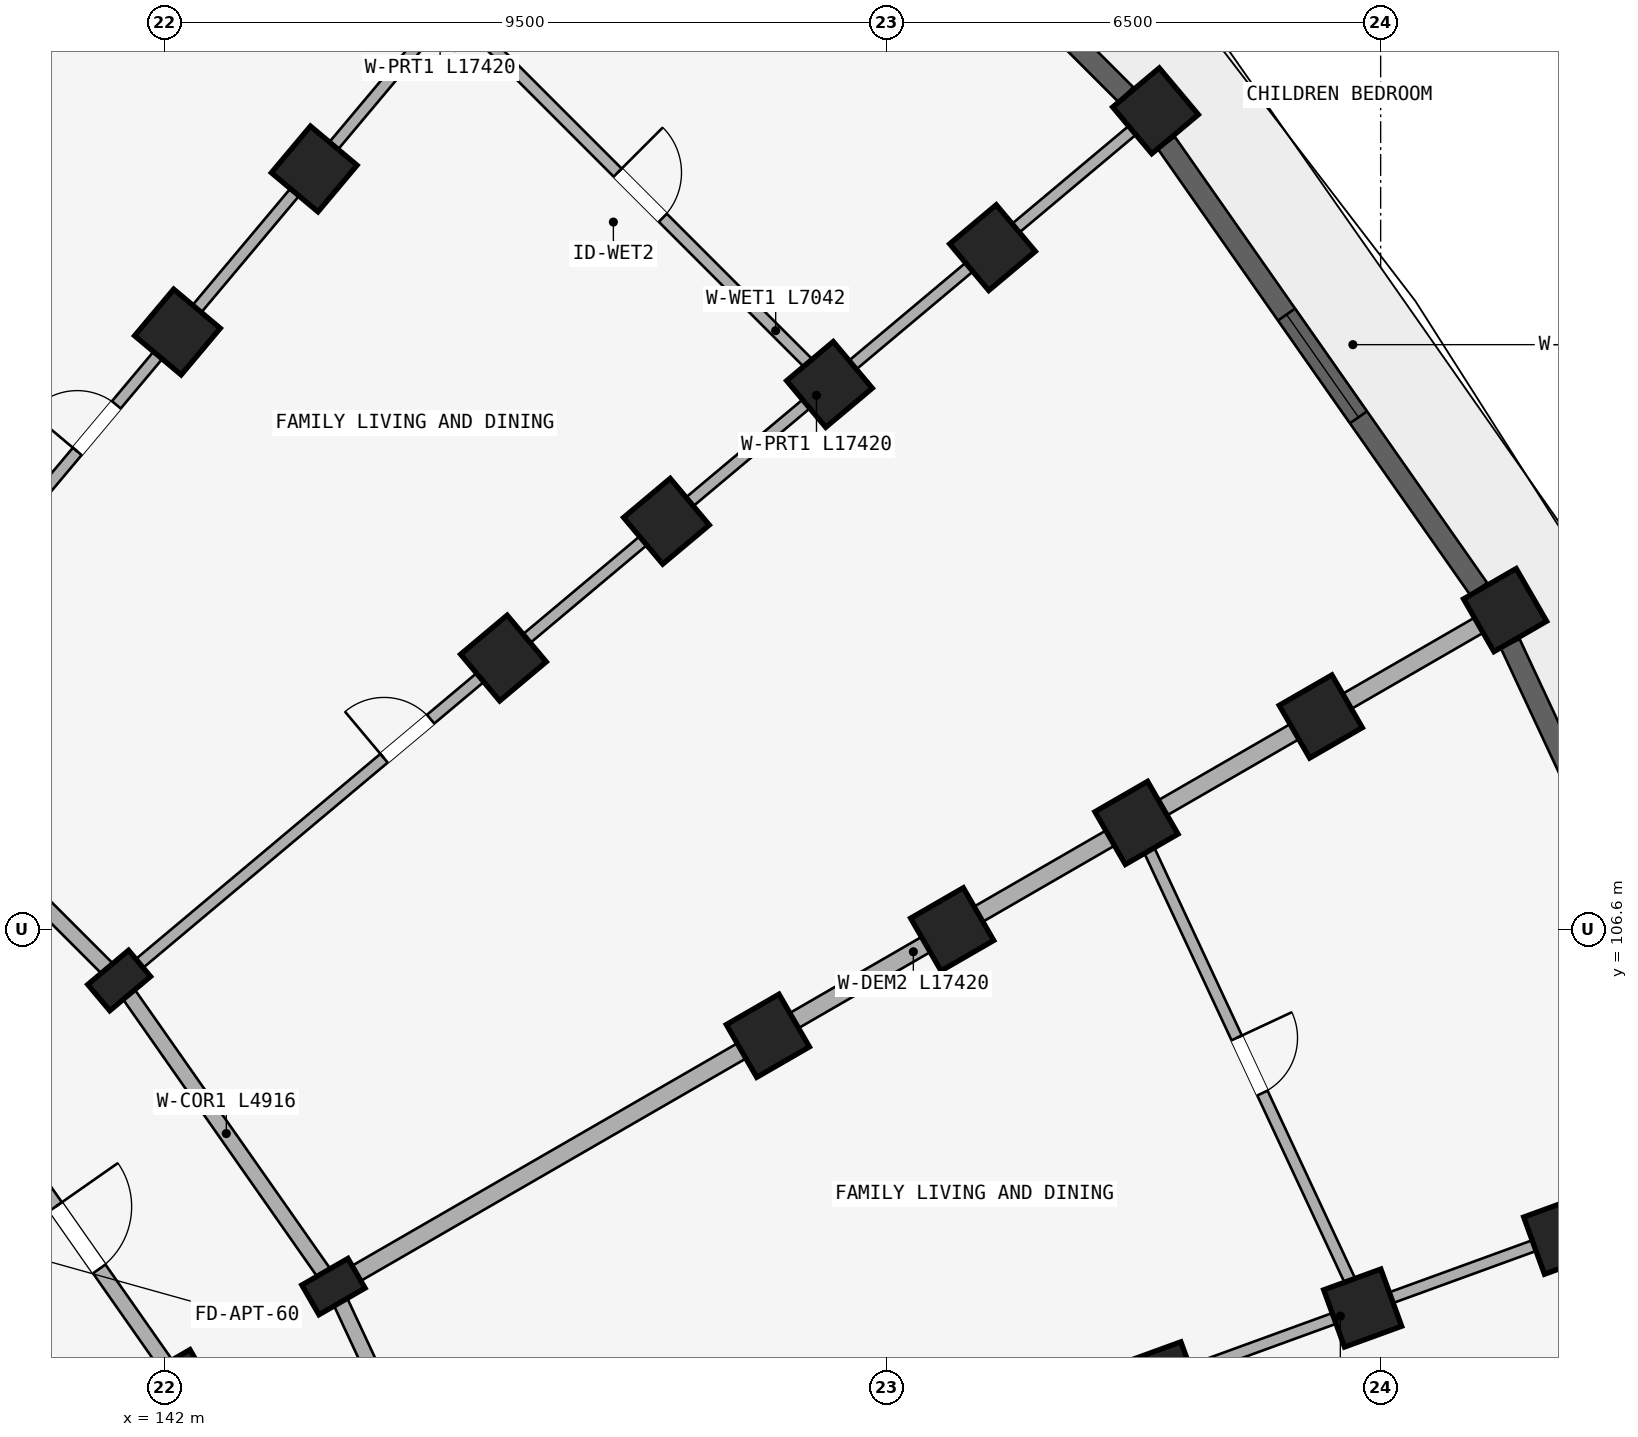
"""IFC4 building model, lengths in metres.
Left out: names, types, materials, properties, quantities, classifications, styles, units other than length and angle.
Written with IfcOpenShell. Run it as: python <this file> out.ifc"""

import sys

from ifc_helpers import new_model, si_unit, direction, frame, frame_2d, origin, origin_2d, place, context, subcontext, project, spatial, rectangle, extrude, element, fill, save


model = new_model("IFC4")
c1 = context("Model", 3, precision=1e-05, world=origin(), true_north=direction((0.0, 1.0)))
c2 = subcontext(c1, "Body", "Model", "MODEL_VIEW")
j1 = project(units=[si_unit("LENGTHUNIT", "METRE"), si_unit("PLANEANGLEUNIT", "RADIAN")], contexts=[c1])
p1 = place(None, origin())
s1 = spatial("IfcSite", under=j1, at=p1, CompositionType="ELEMENT")
p2 = place(p1, origin())
s2 = spatial("IfcBuilding", under=s1, at=p2, CompositionType="ELEMENT")
p3 = place(p2, frame((0.0, 0.0, 11.85)))
s3 = spatial("IfcBuildingStorey", under=s2, at=p3, CompositionType="ELEMENT", Elevation=11.85)
for number, where, z_axis, x_axis in (
    (1, (142.169, 114.458, 0.0), (0.0, 0.0, 1.0), (-0.766, 0.643, 0.0)),
    (2, (143.969, 116.603, 0.0), (0.0, 0.0, 1.0), (-0.766, 0.643, 0.0)),
):
    element("IfcColumn", number, at=place(p3, frame(where, z_axis=z_axis, x_axis=x_axis)), inside=s3, PredefinedType="COLUMN", context=c2, shape_type="SweptSolid", body=[
        extrude(rectangle(XDim=0.8, YDim=0.8, at=origin_2d()), origin(), (0.0, 0.0, 1.0), 2.93),
    ])
p4 = place(p3, frame((141.402, 105.927, 0.0), z_axis=(0.0, 0.0, 1.0), x_axis=(-0.642787609687, 0.766044443119, 0.0)))
e3 = element("IfcColumn", 3, at=p4, inside=s3, PredefinedType="COLUMN", context=c2, shape_type="SweptSolid", body=[
    extrude(rectangle(XDim=0.45, YDim=0.7, at=origin_2d()), origin(), (0.0, 0.0, 1.0), 2.93),
])
for number, where, z_axis, x_axis in (
    (4, (146.458, 110.169, 0.0), (0.0, 0.0, 1.0), (-0.643, 0.766, 0.0)),
    (5, (148.603, 111.969, 0.0), (0.0, 0.0, 1.0), (-0.643, 0.766, 0.0)),
    (6, (150.748, 113.769, 0.0), (0.0, 0.0, 1.0), (-0.643, 0.766, 0.0)),
    (7, (152.893, 115.568, 0.0), (0.0, 0.0, 1.0), (-0.643, 0.766, 0.0)),
    (8, (155.038, 117.368, 0.0), (0.0, 0.0, 1.0), (-0.643, 0.766, 0.0)),
):
    element("IfcColumn", number, at=place(p3, frame(where, z_axis=z_axis, x_axis=x_axis)), inside=s3, PredefinedType="COLUMN", context=c2, shape_type="SweptSolid", body=[
        extrude(rectangle(XDim=0.8, YDim=0.8, at=origin_2d()), origin(), (0.0, 0.0, 1.0), 2.93),
    ])
for number, where, z_axis, x_axis in (
    (9, (142.144, 100.7, 0.0), (0.0, 0.0, 1.0), (-0.5, 0.866, 0.0)),
    (10, (144.222, 101.9, 0.0), (0.0, 0.0, 1.0), (-0.5, 0.866, 0.0)),
):
    element("IfcColumn", number, at=place(p3, frame(where, z_axis=z_axis, x_axis=x_axis)), inside=s3, PredefinedType="COLUMN", context=c2, shape_type="SweptSolid", body=[
        extrude(rectangle(XDim=0.45, YDim=0.7, at=origin_2d()), origin(), (0.0, 0.0, 1.0), 2.93),
    ])
for number, where, z_axis, x_axis in (
    (11, (149.938, 105.2, 0.0), (0.0, 0.0, 1.0), (-0.5, 0.866, 0.0)),
    (12, (152.363, 106.6, 0.0), (0.0, 0.0, 1.0), (-0.5, 0.866, 0.0)),
    (13, (154.787, 108.0, 0.0), (0.0, 0.0, 1.0), (-0.5, 0.866, 0.0)),
    (14, (157.212, 109.4, 0.0), (0.0, 0.0, 1.0), (-0.5, 0.866, 0.0)),
    (15, (159.637, 110.8, 0.0), (0.0, 0.0, 1.0), (-0.5, 0.866, 0.0)),
    (16, (155.132, 100.66, 0.0), (0.0, 0.0, 1.0), (-0.342, 0.94, 0.0)),
    (17, (157.764, 101.618, 0.0), (0.0, 0.0, 1.0), (-0.342, 0.94, 0.0)),
    (18, (160.395, 102.575, 0.0), (0.0, 0.0, 1.0), (-0.342, 0.94, 0.0)),
):
    element("IfcColumn", number, at=place(p3, frame(where, z_axis=z_axis, x_axis=x_axis)), inside=s3, PredefinedType="COLUMN", context=c2, shape_type="SweptSolid", body=[
        extrude(rectangle(XDim=0.8, YDim=0.8, at=origin_2d()), origin(), (0.0, 0.0, 1.0), 2.93),
    ])
p5 = place(p3, frame((137.927, 109.402, 0.0), z_axis=(0.0, 0.0, 1.0), x_axis=(0.707106781187, -0.707106781187, 0.0)))
e19 = element("IfcWall", 19, at=p5, inside=s3, PredefinedType="STANDARD", context=c2, shape_type="SweptSolid", body=[
    extrude(rectangle(XDim=4.916, YDim=0.2, at=frame_2d((2.458, 0.0))), origin(), (0.0, 0.0, 1.0), 2.372),
])
p6 = place(p3, frame((139.564, 104.384, 0.0), z_axis=(0.0, 0.0, 1.0), x_axis=(0.573571637217, -0.819155404658, 0.0)))
e20 = element("IfcWall", 20, at=p6, inside=s3, PredefinedType="STANDARD", context=c2, shape_type="SweptSolid", body=[
    extrude(rectangle(XDim=4.497, YDim=0.2, at=frame_2d((2.249, 0.0))), origin(), (0.0, 0.0, 1.0), 2.372),
])
p7 = place(p6, frame((1.749, 0.0, 0.0)))
e21 = element("IfcOpeningElement", 21, at=p7, cuts=e20, PredefinedType="OPENING", context=c2, shape_type="SweptSolid", body=[
    extrude(rectangle(XDim=1.0, YDim=2.15, at=frame_2d((0.5, 1.075))), frame((0.0, 0.11, 0.0), z_axis=(0.0, -1.0, 0.0), x_axis=(1.0, 0.0, 0.0)), (0.0, 0.0, 1.0), 0.22),
])
p8 = place(p3, frame((141.402, 105.927, 0.0), z_axis=(0.0, 0.0, 1.0), x_axis=(0.573592335331, -0.819140911474, 0.0)))
e22 = element("IfcWall", 22, at=p8, inside=s3, PredefinedType="STANDARD", context=c2, shape_type="SweptSolid", body=[
    extrude(rectangle(XDim=4.916, YDim=0.2, at=frame_2d((2.458, 0.0))), origin(), (0.0, 0.0, 1.0), 2.372),
])
p9 = place(p3, frame((144.222, 101.9, 0.0), z_axis=(0.0, 0.0, 1.0), x_axis=(0.422629854778, -0.906302381024, 0.0)))
e23 = element("IfcWall", 23, at=p9, inside=s3, PredefinedType="STANDARD", context=c2, shape_type="SweptSolid", body=[
    extrude(rectangle(XDim=4.915, YDim=0.2, at=frame_2d((2.458, 0.0))), origin(), (0.0, 0.0, 1.0), 2.372),
])
p10 = place(p9, frame((1.958, 0.0, 0.0)))
e24 = element("IfcOpeningElement", 24, at=p10, cuts=e23, PredefinedType="OPENING", context=c2, shape_type="SweptSolid", body=[
    extrude(rectangle(XDim=1.0, YDim=2.15, at=frame_2d((0.5, 1.075))), frame((0.0, 0.11, 0.0), z_axis=(0.0, -1.0, 0.0), x_axis=(1.0, 0.0, 0.0)), (0.0, 0.0, 1.0), 0.22),
])
p11 = place(p3, frame((133.95, 112.309, 0.0), z_axis=(0.0, 0.0, 1.0), x_axis=(0.499997843263, 0.866026648973, 0.0)))
e25 = element("IfcWall", 25, at=p11, inside=s3, PredefinedType="STANDARD", context=c2, shape_type="SweptSolid", body=[
    extrude(rectangle(XDim=17.42, YDim=0.23, at=frame_2d((8.71, 0.0))), origin(), (0.0, 0.0, 1.0), 2.372),
])
p12 = place(p3, frame((137.991, 109.479, 0.0), z_axis=(0.0, 0.0, 1.0), x_axis=(0.642784757967, 0.766046835987, 0.0)))
e26 = element("IfcWall", 26, at=p12, inside=s3, PredefinedType="PARTITIONING", context=c2, shape_type="SweptSolid", body=[
    extrude(rectangle(XDim=17.42, YDim=0.15, at=frame_2d((8.71, 0.0))), origin(), (0.0, 0.0, 1.0), 2.372),
])
p13 = place(p12, frame((4.45, 0.0, 0.0)))
e27 = element("IfcOpeningElement", 27, at=p13, cuts=e26, PredefinedType="OPENING", context=c2, shape_type="SweptSolid", body=[
    extrude(rectangle(XDim=0.8, YDim=2.1, at=frame_2d((0.4, 1.05))), frame((0.0, 0.085, 0.0), z_axis=(0.0, -1.0, 0.0), x_axis=(1.0, 0.0, 0.0)), (0.0, 0.0, 1.0), 0.17),
])
p14 = place(p3, frame((141.479, 105.991, 0.0), z_axis=(0.0, 0.0, 1.0), x_axis=(0.766046835987, 0.642784757967, 0.0)))
e28 = element("IfcWall", 28, at=p14, inside=s3, PredefinedType="PARTITIONING", context=c2, shape_type="SweptSolid", body=[
    extrude(rectangle(XDim=17.42, YDim=0.15, at=frame_2d((8.71, 0.0))), origin(), (0.0, 0.0, 1.0), 2.372),
])
p15 = place(p14, frame((4.45, 0.0, 0.0)))
e29 = element("IfcOpeningElement", 29, at=p15, cuts=e28, PredefinedType="OPENING", context=c2, shape_type="SweptSolid", body=[
    extrude(rectangle(XDim=0.8, YDim=2.1, at=frame_2d((0.4, 1.05))), frame((0.0, 0.085, 0.0), z_axis=(0.0, -1.0, 0.0), x_axis=(1.0, 0.0, 0.0)), (0.0, 0.0, 1.0), 0.17),
])
p16 = place(p3, frame((144.309, 101.95, 0.0), z_axis=(0.0, 0.0, 1.0), x_axis=(0.866026648973, 0.499997843263, 0.0)))
e30 = element("IfcWall", 30, at=p16, inside=s3, PredefinedType="STANDARD", context=c2, shape_type="SweptSolid", body=[
    extrude(rectangle(XDim=17.42, YDim=0.23, at=frame_2d((8.71, 0.0))), origin(), (0.0, 0.0, 1.0), 2.372),
])
p17 = place(p3, frame((146.393, 97.479, 0.0), z_axis=(0.0, 0.0, 1.0), x_axis=(0.939691901159, 0.342022120477, 0.0)))
e31 = element("IfcWall", 31, at=p17, inside=s3, PredefinedType="PARTITIONING", context=c2, shape_type="SweptSolid", body=[
    extrude(rectangle(XDim=17.42, YDim=0.15, at=frame_2d((8.71, 0.0))), origin(), (0.0, 0.0, 1.0), 2.372),
])
p18 = place(p17, frame((4.45, 0.0, 0.0)))
e32 = element("IfcOpeningElement", 32, at=p18, cuts=e31, PredefinedType="OPENING", context=c2, shape_type="SweptSolid", body=[
    extrude(rectangle(XDim=0.8, YDim=2.1, at=frame_2d((0.4, 1.05))), frame((0.0, 0.085, 0.0), z_axis=(0.0, -1.0, 0.0), x_axis=(1.0, 0.0, 0.0)), (0.0, 0.0, 1.0), 0.17),
])
p19 = place(p3, frame((145.769, 118.748, 0.0), z_axis=(0.0, 0.0, 1.0), x_axis=(0.707106781187, -0.707106781187, 0.0)))
e33 = element("IfcWall", 33, at=p19, inside=s3, PredefinedType="PLUMBINGWALL", context=c2, shape_type="SweptSolid", body=[
    extrude(rectangle(XDim=7.042, YDim=0.15, at=frame_2d((3.521, 0.0))), origin(), (0.0, 0.0, 1.0), 2.372),
])
p20 = place(p19, frame((3.101, 0.0, 0.0)))
e34 = element("IfcOpeningElement", 34, at=p20, cuts=e33, PredefinedType="OPENING", context=c2, shape_type="SweptSolid", body=[
    extrude(rectangle(XDim=0.84, YDim=2.1, at=frame_2d((0.42, 1.05))), frame((0.0, 0.085, 0.0), z_axis=(0.0, -1.0, 0.0), x_axis=(1.0, 0.0, 0.0)), (0.0, 0.0, 1.0), 0.17),
])
p21 = place(p3, frame((154.787, 108.0, 0.0), z_axis=(0.0, 0.0, 1.0), x_axis=(0.422640621205, -0.906297360311, 0.0)))
e35 = element("IfcWall", 35, at=p21, inside=s3, PredefinedType="PLUMBINGWALL", context=c2, shape_type="SweptSolid", body=[
    extrude(rectangle(XDim=7.042, YDim=0.15, at=frame_2d((3.521, 0.0))), origin(), (0.0, 0.0, 1.0), 2.372),
])
p22 = place(p21, frame((3.121, 0.0, 0.0)))
e36 = element("IfcOpeningElement", 36, at=p22, cuts=e35, PredefinedType="OPENING", context=c2, shape_type="SweptSolid", body=[
    extrude(rectangle(XDim=0.8, YDim=2.1, at=frame_2d((0.4, 1.05))), frame((0.0, 0.085, 0.0), z_axis=(0.0, -1.0, 0.0), x_axis=(1.0, 0.0, 0.0)), (0.0, 0.0, 1.0), 0.17),
])
p23 = place(p3, frame((149.582, 122.648, 0.0), z_axis=(0.0, 0.0, 1.0), x_axis=(0.707106781187, -0.707106781187, 0.0)))
e37 = element("IfcWall", 37, at=p23, inside=s3, PredefinedType="STANDARD", context=c2, shape_type="SweptSolid", body=[
    extrude(rectangle(XDim=7.164, YDim=0.275, at=frame_2d((3.582, 0.0))), origin(), (0.0, 0.0, 1.0), 2.372),
])
p24 = place(p23, frame((4.69, 0.0, 0.522)))
e38 = element("IfcOpeningElement", 38, at=p24, cuts=e37, PredefinedType="OPENING", context=c2, shape_type="SweptSolid", body=[
    extrude(rectangle(XDim=1.2, YDim=1.5, at=frame_2d((0.6, 0.75))), frame((0.0, 0.147, 0.0), z_axis=(0.0, -1.0, 0.0), x_axis=(1.0, 0.0, 0.0)), (0.0, 0.0, 1.0), 0.295),
])
p25 = place(p23, frame((1.847, 0.0, 0.0)))
e39 = element("IfcOpeningElement", 39, at=p25, cuts=e37, PredefinedType="OPENING", context=c2, shape_type="SweptSolid", body=[
    extrude(rectangle(XDim=1.32, YDim=2.15, at=frame_2d((0.66, 1.075))), frame((0.0, 0.147, 0.0), z_axis=(0.0, -1.0, 0.0), x_axis=(1.0, 0.0, 0.0)), (0.0, 0.0, 1.0), 0.295),
])
p26 = place(p3, frame((155.181, 116.947, 0.0), z_axis=(0.0, 0.0, 1.0), x_axis=(0.573562972382, -0.819161471697, 0.0)))
e40 = element("IfcWall", 40, at=p26, inside=s3, PredefinedType="STANDARD", context=c2, shape_type="SweptSolid", body=[
    extrude(rectangle(XDim=7.164, YDim=0.275, at=frame_2d((3.582, 0.0))), origin(), (0.0, 0.0, 1.0), 2.372),
])
p27 = place(p26, frame((2.757, 0.0, 0.422)))
e41 = element("IfcOpeningElement", 41, at=p27, cuts=e40, PredefinedType="OPENING", context=c2, shape_type="SweptSolid", body=[
    extrude(rectangle(XDim=1.65, YDim=1.75, at=frame_2d((0.825, 0.875))), frame((0.0, 0.147, 0.0), z_axis=(0.0, -1.0, 0.0), x_axis=(1.0, 0.0, 0.0)), (0.0, 0.0, 1.0), 0.295),
])
p28 = place(p3, frame((159.704, 110.36, 0.0), z_axis=(0.0, 0.0, 1.0), x_axis=(0.422633596215, -0.906300636296, 0.0)))
e42 = element("IfcWall", 42, at=p28, inside=s3, PredefinedType="STANDARD", context=c2, shape_type="SweptSolid", body=[
    extrude(rectangle(XDim=7.164, YDim=0.275, at=frame_2d((3.582, 0.0))), origin(), (0.0, 0.0, 1.0), 2.372),
])
p29 = place(p28, frame((2.682, 0.0, 0.522)))
e43 = element("IfcOpeningElement", 43, at=p29, cuts=e42, PredefinedType="OPENING", context=c2, shape_type="SweptSolid", body=[
    extrude(rectangle(XDim=1.8, YDim=1.65, at=frame_2d((0.9, 0.825))), frame((0.0, 0.147, 0.0), z_axis=(0.0, -1.0, 0.0), x_axis=(1.0, 0.0, 0.0)), (0.0, 0.0, 1.0), 0.295),
])
p30 = place(p27, origin())
e44 = element("IfcWindow", 44, at=p30, inside=s3, PartitioningType="DOUBLE_PANEL_VERTICAL", PredefinedType="WINDOW", context=c2, shape_type="SweptSolid", body=[
    extrude(rectangle(XDim=1.65, YDim=1.75, at=frame_2d((0.825, 0.875))), frame((0.0, 0.03, 0.0), z_axis=(0.0, -1.0, 0.0), x_axis=(1.0, 0.0, 0.0)), (0.0, 0.0, 1.0), 0.06),
])
fill(e41, e44)
p31 = place(p13, frame((0.8, 0.0, 0.0), z_axis=(0.0, 0.0, 1.0), x_axis=(-1.0, 0.0, 0.0)))
e45 = element("IfcDoor", 45, at=p31, inside=s3, OperationType="SINGLE_SWING_RIGHT", PredefinedType="DOOR", context=c2, shape_type="SweptSolid", body=[
    extrude(rectangle(XDim=0.8, YDim=2.1, at=frame_2d((0.4, 1.05))), frame((0.0, 0.025, 0.0), z_axis=(0.0, -1.0, 0.0), x_axis=(1.0, 0.0, 0.0)), (0.0, 0.0, 1.0), 0.05),
])
fill(e27, e45)
p32 = place(p15, origin())
e46 = element("IfcDoor", 46, at=p32, inside=s3, OperationType="SINGLE_SWING_LEFT", PredefinedType="DOOR", context=c2, shape_type="SweptSolid", body=[
    extrude(rectangle(XDim=0.8, YDim=2.1, at=frame_2d((0.4, 1.05))), frame((0.0, 0.025, 0.0), z_axis=(0.0, -1.0, 0.0), x_axis=(1.0, 0.0, 0.0)), (0.0, 0.0, 1.0), 0.05),
])
fill(e29, e46)
p33 = place(p20, origin())
e47 = element("IfcDoor", 47, at=p33, inside=s3, OperationType="SINGLE_SWING_LEFT", PredefinedType="DOOR", context=c2, shape_type="SweptSolid", body=[
    extrude(rectangle(XDim=0.84, YDim=2.1, at=frame_2d((0.42, 1.05))), frame((0.0, 0.025, 0.0), z_axis=(0.0, -1.0, 0.0), x_axis=(1.0, 0.0, 0.0)), (0.0, 0.0, 1.0), 0.05),
])
fill(e34, e47)
p34 = place(p22, origin())
e48 = element("IfcDoor", 48, at=p34, inside=s3, OperationType="SINGLE_SWING_LEFT", PredefinedType="DOOR", context=c2, shape_type="SweptSolid", body=[
    extrude(rectangle(XDim=0.8, YDim=2.1, at=frame_2d((0.4, 1.05))), frame((0.0, 0.025, 0.0), z_axis=(0.0, -1.0, 0.0), x_axis=(1.0, 0.0, 0.0)), (0.0, 0.0, 1.0), 0.05),
])
fill(e36, e48)
p35 = place(p7, origin())
e49 = element("IfcDoor", 49, at=p35, inside=s3, OperationType="SINGLE_SWING_LEFT", PredefinedType="DOOR", context=c2, shape_type="SweptSolid", body=[
    extrude(rectangle(XDim=1.0, YDim=2.15, at=frame_2d((0.5, 1.075))), frame((0.0, 0.025, 0.0), z_axis=(0.0, -1.0, 0.0), x_axis=(1.0, 0.0, 0.0)), (0.0, 0.0, 1.0), 0.05),
])
fill(e21, e49)
save(model, sys.argv[1])
